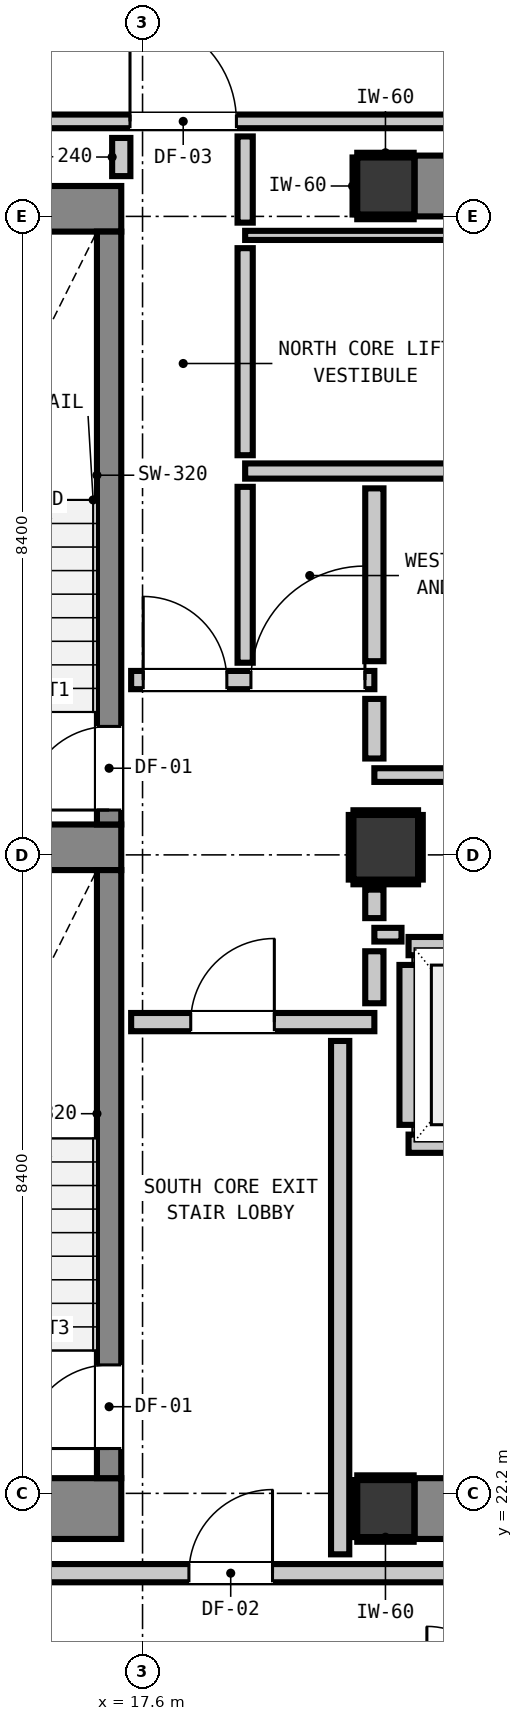
"""IFC4 building model, lengths in metres.
Left out: names, types, materials, properties, quantities, classifications, styles, units other than length and angle.
Written with IfcOpenShell. Run it as: python <this file> out.ifc"""

import sys

from ifc_helpers import new_model, si_unit, direction, frame, frame_2d, origin, origin_2d, place, context, subcontext, project, spatial, rectangle, extrude, element, fill, save


model = new_model("IFC4")
c1 = context("Model", 3, precision=1e-05, world=origin(), true_north=direction((0.0, 1.0)))
c2 = subcontext(c1, "Body", "Model", "MODEL_VIEW")
j1 = project(units=[si_unit("LENGTHUNIT", "METRE"), si_unit("PLANEANGLEUNIT", "RADIAN")], contexts=[c1])
p1 = place(None, origin())
s1 = spatial("IfcSite", under=j1, at=p1, CompositionType="ELEMENT")
p2 = place(p1, origin())
s2 = spatial("IfcBuilding", under=s1, at=p2, CompositionType="ELEMENT")
p3 = place(p2, frame((0.0, 0.0, 265.56)))
s3 = spatial("IfcBuildingStorey", under=s2, at=p3, CompositionType="ELEMENT", Elevation=265.56)
for number, where, z_axis, x_axis in (
    (1, (20.8, 22.0, 0.0), (0.0, 0.0, 1.0), (1.0, 0.0, 0.0)),
    (2, (20.8, 39.4, 0.0), (0.0, 0.0, 1.0), (1.0, 0.0, 0.0)),
):
    element("IfcColumn", number, at=place(p3, frame(where, z_axis=z_axis, x_axis=x_axis)), inside=s3, PredefinedType="COLUMN", context=c2, shape_type="SweptSolid", body=[
        extrude(rectangle(XDim=0.75, YDim=0.75, at=origin_2d()), origin(), (0.0, 0.0, 1.0), 3.32),
    ])
p4 = place(p3, frame((13.24, 22.0, 0.0), z_axis=(0.0, 0.0, 1.0), x_axis=(1.0, 0.0, 0.0)))
e3 = element("IfcWall", 3, at=p4, inside=s3, PredefinedType="SHEAR", context=c2, shape_type="SweptSolid", body=[
    extrude(rectangle(XDim=4.08, YDim=0.8, at=frame_2d((2.04, 0.0))), origin(), (0.0, 0.0, 1.0), 3.32),
])
p5 = place(p3, frame((13.24, 39.1, 0.0), z_axis=(0.0, 0.0, 1.0), x_axis=(1.0, 0.0, 0.0)))
e4 = element("IfcWall", 4, at=p5, inside=s3, PredefinedType="SHEAR", context=c2, shape_type="SweptSolid", body=[
    extrude(rectangle(XDim=4.08, YDim=0.6, at=frame_2d((2.04, 0.0))), origin(), (0.0, 0.0, 1.0), 3.32),
])
p6 = place(p3, frame((13.78, 30.7, 0.0), z_axis=(0.0, 0.0, 1.0), x_axis=(1.0, 0.0, 0.0)))
e5 = element("IfcWall", 5, at=p6, inside=s3, PredefinedType="SHEAR", context=c2, shape_type="SweptSolid", body=[
    extrude(rectangle(XDim=3.54, YDim=0.6, at=frame_2d((1.77, 0.0))), origin(), (0.0, 0.0, 1.0), 3.32),
])
for number, where, z_axis, x_axis in (
    (6, (21.18, 22.0, 0.0), (0.0, 0.0, 1.0), (1.0, 0.0, 0.0)),
    (7, (21.18, 39.4, 0.0), (0.0, 0.0, 1.0), (1.0, 0.0, 0.0)),
):
    element("IfcWall", number, at=place(p3, frame(where, z_axis=z_axis, x_axis=x_axis)), inside=s3, PredefinedType="SHEAR", context=c2, shape_type="SweptSolid", body=[
        extrude(rectangle(XDim=7.64, YDim=0.8, at=frame_2d((3.82, 0.0))), origin(), (0.0, 0.0, 1.0), 3.32),
    ])
p7 = place(p3, frame((17.16, 31.0, 0.0), z_axis=(0.0, 0.0, 1.0), x_axis=(0.0, 1.0, 0.0)))
e8 = element("IfcWall", 8, at=p7, inside=s3, PredefinedType="SHEAR", context=c2, shape_type="SweptSolid", body=[
    extrude(rectangle(XDim=7.8, YDim=0.32, at=frame_2d((3.9, 0.0))), origin(), (0.0, 0.0, 1.0), 3.32),
])
p8 = place(p7, frame((0.19, 0.0, 0.0)))
e9 = element("IfcOpeningElement", 9, at=p8, cuts=e8, PredefinedType="OPENING", context=c2, shape_type="SweptSolid", body=[
    extrude(rectangle(XDim=1.1, YDim=2.15, at=frame_2d((0.55, 1.075))), frame((0.0, 0.17, 0.0), z_axis=(0.0, -1.0, 0.0), x_axis=(1.0, 0.0, 0.0)), (0.0, 0.0, 1.0), 0.34),
])
p9 = place(p3, frame((17.16, 22.4, 0.0), z_axis=(0.0, 0.0, 1.0), x_axis=(0.0, 1.0, 0.0)))
e10 = element("IfcWall", 10, at=p9, inside=s3, PredefinedType="SHEAR", context=c2, shape_type="SweptSolid", body=[
    extrude(rectangle(XDim=8.0, YDim=0.32, at=frame_2d((4.0, 0.0))), origin(), (0.0, 0.0, 1.0), 3.32),
])
p10 = place(p9, frame((0.39, 0.0, 0.0)))
e11 = element("IfcOpeningElement", 11, at=p10, cuts=e10, PredefinedType="OPENING", context=c2, shape_type="SweptSolid", body=[
    extrude(rectangle(XDim=1.1, YDim=2.15, at=frame_2d((0.55, 1.075))), frame((0.0, 0.17, 0.0), z_axis=(0.0, -1.0, 0.0), x_axis=(1.0, 0.0, 0.0)), (0.0, 0.0, 1.0), 0.34),
])
p11 = place(p3, frame((20.8, 30.7, 0.0), z_axis=(0.0, 0.0, 1.0), x_axis=(1.0, 0.0, 0.0)))
e12 = element("IfcColumn", 12, at=p11, inside=s3, PredefinedType="COLUMN", context=c2, shape_type="SweptSolid", body=[
    extrude(rectangle(XDim=0.85, YDim=0.85, at=origin_2d()), origin(), (0.0, 0.0, 1.0), 3.32),
])
for number, where, z_axis, x_axis in (
    (13, (21.1, 26.8, 0.0), (0.0, 0.0, 1.0), (1.0, 0.0, 0.0)),
    (14, (21.1, 29.4, 0.0), (0.0, 0.0, 1.0), (1.0, 0.0, 0.0)),
):
    element("IfcWall", number, at=place(p3, frame(where, z_axis=z_axis, x_axis=x_axis)), inside=s3, PredefinedType="PARTITIONING", context=c2, shape_type="SweptSolid", body=[
        extrude(rectangle(XDim=2.2, YDim=0.24, at=frame_2d((1.1, 0.0))), origin(), (0.0, 0.0, 1.0), 3.1),
    ])
p12 = place(p3, frame((21.1, 27.048, 0.0), z_axis=(0.0, 0.0, 1.0), x_axis=(0.0, 1.0, 0.0)))
e15 = element("IfcWall", 15, at=p12, inside=s3, PredefinedType="PARTITIONING", context=c2, shape_type="SweptSolid", body=[
    extrude(rectangle(XDim=2.104, YDim=0.24, at=frame_2d((1.052, 0.0))), origin(), (0.0, 0.0, 1.0), 2.335),
])
p13 = place(p3, frame((13.012, 21.15, 0.0), z_axis=(0.0, 0.0, 1.0), x_axis=(1.0, 0.0, 0.0)))
e16 = element("IfcWall", 16, at=p13, inside=s3, PredefinedType="PARTITIONING", context=c2, shape_type="SweptSolid", body=[
    extrude(rectangle(XDim=28.201, YDim=0.24, at=frame_2d((14.101, 0.0))), origin(), (0.0, 0.0, 1.0), 3.1),
])
p14 = place(p13, frame((5.198, 0.0, 0.0)))
e17 = element("IfcOpeningElement", 17, at=p14, cuts=e16, PredefinedType="OPENING", context=c2, shape_type="SweptSolid", body=[
    extrude(rectangle(XDim=1.1, YDim=2.15, at=frame_2d((0.55, 1.075))), frame((0.0, 0.13, 0.0), z_axis=(0.0, -1.0, 0.0), x_axis=(1.0, 0.0, 0.0)), (0.0, 0.0, 1.0), 0.26),
])
p15 = place(p3, frame((17.45, 28.4, 0.0), z_axis=(0.0, 0.0, 1.0), x_axis=(1.0, 0.0, 0.0)))
e18 = element("IfcWall", 18, at=p15, inside=s3, PredefinedType="PARTITIONING", context=c2, shape_type="SweptSolid", body=[
    extrude(rectangle(XDim=3.2, YDim=0.24, at=frame_2d((1.6, 0.0))), origin(), (0.0, 0.0, 1.0), 3.1),
])
p16 = place(p15, frame((0.784, 0.0, 0.0)))
e19 = element("IfcOpeningElement", 19, at=p16, cuts=e18, PredefinedType="OPENING", context=c2, shape_type="SweptSolid", body=[
    extrude(rectangle(XDim=1.1, YDim=2.15, at=frame_2d((0.55, 1.075))), frame((0.0, 0.13, 0.0), z_axis=(0.0, -1.0, 0.0), x_axis=(1.0, 0.0, 0.0)), (0.0, 0.0, 1.0), 0.26),
])
p17 = place(p3, frame((17.45, 32.9, 0.0), z_axis=(0.0, 0.0, 1.0), x_axis=(1.0, 0.0, 0.0)))
e20 = element("IfcWall", 20, at=p17, inside=s3, PredefinedType="PARTITIONING", context=c2, shape_type="SweptSolid", body=[
    extrude(rectangle(XDim=3.2, YDim=0.24, at=frame_2d((1.6, 0.0))), origin(), (0.0, 0.0, 1.0), 3.1),
])
p18 = place(p17, frame((0.159, 0.0, 0.0)))
e21 = element("IfcOpeningElement", 21, at=p18, cuts=e20, PredefinedType="OPENING", context=c2, shape_type="SweptSolid", body=[
    extrude(rectangle(XDim=1.1, YDim=2.15, at=frame_2d((0.55, 1.075))), frame((0.0, 0.13, 0.0), z_axis=(0.0, -1.0, 0.0), x_axis=(1.0, 0.0, 0.0)), (0.0, 0.0, 1.0), 0.26),
])
p19 = place(p17, frame((1.576, 0.0, 0.0)))
e22 = element("IfcOpeningElement", 22, at=p19, cuts=e20, PredefinedType="OPENING", context=c2, shape_type="SweptSolid", body=[
    extrude(rectangle(XDim=1.5, YDim=2.15, at=frame_2d((0.75, 1.075))), frame((0.0, 0.13, 0.0), z_axis=(0.0, -1.0, 0.0), x_axis=(1.0, 0.0, 0.0)), (0.0, 0.0, 1.0), 0.26),
])
p20 = place(p3, frame((18.95, 35.65, 0.0), z_axis=(0.0, 0.0, 1.0), x_axis=(1.0, 0.0, 0.0)))
e23 = element("IfcWall", 23, at=p20, inside=s3, PredefinedType="PARTITIONING", context=c2, shape_type="SweptSolid", body=[
    extrude(rectangle(XDim=11.025, YDim=0.2, at=frame_2d((5.513, 0.0))), origin(), (0.0, 0.0, 1.0), 3.1),
])
p21 = place(p20, frame((9.749, 0.0, 0.0)))
e24 = element("IfcOpeningElement", 24, at=p21, cuts=e23, PredefinedType="OPENING", context=c2, shape_type="SweptSolid", body=[
    extrude(rectangle(XDim=0.9, YDim=2.1, at=frame_2d((0.45, 1.05))), frame((0.0, 0.11, 0.0), z_axis=(0.0, -1.0, 0.0), x_axis=(1.0, 0.0, 0.0)), (0.0, 0.0, 1.0), 0.22),
])
p22 = place(p3, frame((20.65, 29.55, 0.0), z_axis=(0.0, 0.0, 1.0), x_axis=(1.0, 0.0, 0.0)))
e25 = element("IfcWall", 25, at=p22, inside=s3, PredefinedType="PARTITIONING", context=c2, shape_type="SweptSolid", body=[
    extrude(rectangle(XDim=0.357, YDim=0.18, at=frame_2d((0.179, 0.0))), origin(), (0.0, 0.0, 1.0), 3.1),
])
p23 = place(p3, frame((20.65, 31.65, 0.0), z_axis=(0.0, 0.0, 1.0), x_axis=(1.0, 0.0, 0.0)))
e26 = element("IfcWall", 26, at=p23, inside=s3, PredefinedType="PARTITIONING", context=c2, shape_type="SweptSolid", body=[
    extrude(rectangle(XDim=7.7, YDim=0.18, at=frame_2d((3.85, 0.0))), origin(), (0.0, 0.0, 1.0), 3.1),
])
p24 = place(p23, frame((4.673, 0.0, 0.0)))
e27 = element("IfcOpeningElement", 27, at=p24, cuts=e26, PredefinedType="OPENING", context=c2, shape_type="SweptSolid", body=[
    extrude(rectangle(XDim=0.9, YDim=2.1, at=frame_2d((0.45, 1.05))), frame((0.0, 0.1, 0.0), z_axis=(0.0, -1.0, 0.0), x_axis=(1.0, 0.0, 0.0)), (0.0, 0.0, 1.0), 0.2),
])
p25 = place(p3, frame((4.587, 40.25, 0.0), z_axis=(0.0, 0.0, 1.0), x_axis=(1.0, 0.0, 0.0)))
e28 = element("IfcWall", 28, at=p25, inside=s3, PredefinedType="PARTITIONING", context=c2, shape_type="SweptSolid", body=[
    extrude(rectangle(XDim=36.626, YDim=0.18, at=frame_2d((18.313, 0.0))), origin(), (0.0, 0.0, 1.0), 3.1),
])
p26 = place(p25, frame((12.848, 0.0, 0.0)))
e29 = element("IfcOpeningElement", 29, at=p26, cuts=e28, PredefinedType="OPENING", context=c2, shape_type="SweptSolid", body=[
    extrude(rectangle(XDim=1.4, YDim=2.15, at=frame_2d((0.7, 1.075))), frame((0.0, 0.1, 0.0), z_axis=(0.0, -1.0, 0.0), x_axis=(1.0, 0.0, 0.0)), (0.0, 0.0, 1.0), 0.2),
])
p27 = place(p25, frame((3.362, 0.0, 0.0)))
e30 = element("IfcOpeningElement", 30, at=p27, cuts=e28, PredefinedType="OPENING", context=c2, shape_type="SweptSolid", body=[
    extrude(rectangle(XDim=0.9, YDim=2.1, at=frame_2d((0.45, 1.05))), frame((0.0, 0.1, 0.0), z_axis=(0.0, -1.0, 0.0), x_axis=(1.0, 0.0, 0.0)), (0.0, 0.0, 1.0), 0.2),
])
p28 = place(p3, frame((18.95, 38.75, 0.0), z_axis=(0.0, 0.0, 1.0), x_axis=(1.0, 0.0, 0.0)))
e31 = element("IfcWall", 31, at=p28, inside=s3, PredefinedType="PARTITIONING", context=c2, shape_type="SweptSolid", body=[
    extrude(rectangle(XDim=13.56, YDim=0.12, at=frame_2d((6.78, 0.0))), origin(), (0.0, 0.0, 1.0), 3.1),
])
p29 = place(p3, frame((17.32, 39.53, 0.0), z_axis=(0.0, 0.0, 1.0), x_axis=(0.0, 1.0, 0.0)))
e32 = element("IfcWall", 32, at=p29, inside=s3, PredefinedType="PARTITIONING", context=c2, shape_type="SweptSolid", body=[
    extrude(rectangle(XDim=0.502, YDim=0.24, at=frame_2d((0.251, 0.0))), origin(), (0.0, 0.0, 1.0), 3.1),
])
p30 = place(p3, frame((20.2, 21.398, 0.0), z_axis=(0.0, 0.0, 1.0), x_axis=(0.0, 1.0, 0.0)))
e33 = element("IfcWall", 33, at=p30, inside=s3, PredefinedType="PARTITIONING", context=c2, shape_type="SweptSolid", body=[
    extrude(rectangle(XDim=6.754, YDim=0.24, at=frame_2d((3.377, 0.0))), origin(), (0.0, 0.0, 1.0), 3.1),
])
p31 = place(p3, frame((20.65, 28.648, 0.0), z_axis=(0.0, 0.0, 1.0), x_axis=(0.0, 1.0, 0.0)))
e34 = element("IfcWall", 34, at=p31, inside=s3, PredefinedType="PARTITIONING", context=c2, shape_type="SweptSolid", body=[
    extrude(rectangle(XDim=0.684, YDim=0.24, at=frame_2d((0.342, 0.0))), origin(), (0.0, 0.0, 1.0), 2.335),
])
p32 = place(p3, frame((20.65, 29.768, 0.0), z_axis=(0.0, 0.0, 1.0), x_axis=(0.0, 1.0, 0.0)))
e35 = element("IfcWall", 35, at=p32, inside=s3, PredefinedType="PARTITIONING", context=c2, shape_type="SweptSolid", body=[
    extrude(rectangle(XDim=0.375, YDim=0.24, at=frame_2d((0.188, 0.0))), origin(), (0.0, 0.0, 1.0), 2.335),
])
p33 = place(p3, frame((20.65, 31.868, 0.0), z_axis=(0.0, 0.0, 1.0), x_axis=(0.0, 1.0, 0.0)))
e36 = element("IfcWall", 36, at=p33, inside=s3, PredefinedType="PARTITIONING", context=c2, shape_type="SweptSolid", body=[
    extrude(rectangle(XDim=0.784, YDim=0.24, at=frame_2d((0.392, 0.0))), origin(), (0.0, 0.0, 1.0), 2.335),
])
p34 = place(p3, frame((20.65, 33.148, 0.0), z_axis=(0.0, 0.0, 1.0), x_axis=(0.0, 1.0, 0.0)))
e37 = element("IfcWall", 37, at=p34, inside=s3, PredefinedType="PARTITIONING", context=c2, shape_type="SweptSolid", body=[
    extrude(rectangle(XDim=2.274, YDim=0.24, at=frame_2d((1.137, 0.0))), origin(), (0.0, 0.0, 1.0), 2.335),
])
p35 = place(p3, frame((18.95, 33.128, 0.0), z_axis=(0.0, 0.0, 1.0), x_axis=(0.0, 1.0, 0.0)))
e38 = element("IfcWall", 38, at=p35, inside=s3, PredefinedType="PARTITIONING", context=c2, shape_type="SweptSolid", body=[
    extrude(rectangle(XDim=2.314, YDim=0.2, at=frame_2d((1.157, 0.0))), origin(), (0.0, 0.0, 1.0), 3.1),
])
p36 = place(p3, frame((18.95, 35.858, 0.0), z_axis=(0.0, 0.0, 1.0), x_axis=(0.0, 1.0, 0.0)))
e39 = element("IfcWall", 39, at=p36, inside=s3, PredefinedType="PARTITIONING", context=c2, shape_type="SweptSolid", body=[
    extrude(rectangle(XDim=2.724, YDim=0.2, at=frame_2d((1.362, 0.0))), origin(), (0.0, 0.0, 1.0), 3.1),
])
p37 = place(p3, frame((18.95, 38.918, 0.0), z_axis=(0.0, 0.0, 1.0), x_axis=(0.0, 1.0, 0.0)))
e40 = element("IfcWall", 40, at=p37, inside=s3, PredefinedType="PARTITIONING", context=c2, shape_type="SweptSolid", body=[
    extrude(rectangle(XDim=1.134, YDim=0.2, at=frame_2d((0.567, 0.0))), origin(), (0.0, 0.0, 1.0), 3.1),
])
for number, where, z_axis, x_axis in (
    (41, (20.425, 21.593, 0.0), (0.0, 0.0, 1.0), (1.0, 0.0, 0.0)),
    (42, (20.425, 22.407, 0.0), (0.0, 0.0, 1.0), (1.0, 0.0, 0.0)),
):
    element("IfcWall", number, at=place(p3, frame(where, z_axis=z_axis, x_axis=x_axis)), inside=s3, PredefinedType="PARTITIONING", context=c2, shape_type="SweptSolid", body=[
        extrude(rectangle(XDim=0.742, YDim=0.06, at=frame_2d((0.371, 0.0))), origin(), (0.0, 0.0, 1.0), 1.45),
    ])
p38 = place(p3, frame((20.393, 21.625, 0.0), z_axis=(0.0, 0.0, 1.0), x_axis=(0.0, 1.0, 0.0)))
e43 = element("IfcWall", 43, at=p38, inside=s3, PredefinedType="PARTITIONING", context=c2, shape_type="SweptSolid", body=[
    extrude(rectangle(XDim=0.75, YDim=0.06, at=frame_2d((0.375, 0.0))), origin(), (0.0, 0.0, 1.0), 1.45),
])
for number, where, z_axis, x_axis in (
    (44, (20.425, 38.993, 0.0), (0.0, 0.0, 1.0), (1.0, 0.0, 0.0)),
    (45, (20.425, 39.807, 0.0), (0.0, 0.0, 1.0), (1.0, 0.0, 0.0)),
):
    element("IfcWall", number, at=place(p3, frame(where, z_axis=z_axis, x_axis=x_axis)), inside=s3, PredefinedType="PARTITIONING", context=c2, shape_type="SweptSolid", body=[
        extrude(rectangle(XDim=0.742, YDim=0.06, at=frame_2d((0.371, 0.0))), origin(), (0.0, 0.0, 1.0), 1.45),
    ])
p39 = place(p3, frame((20.393, 39.025, 0.0), z_axis=(0.0, 0.0, 1.0), x_axis=(0.0, 1.0, 0.0)))
e46 = element("IfcWall", 46, at=p39, inside=s3, PredefinedType="PARTITIONING", context=c2, shape_type="SweptSolid", body=[
    extrude(rectangle(XDim=0.75, YDim=0.06, at=frame_2d((0.375, 0.0))), origin(), (0.0, 0.0, 1.0), 1.45),
])
for number, where, z_axis, x_axis in (
    (47, (20.375, 30.243, 0.0), (0.0, 0.0, 1.0), (1.0, 0.0, 0.0)),
    (48, (20.375, 31.157, 0.0), (0.0, 0.0, 1.0), (1.0, 0.0, 0.0)),
    (49, (20.343, 30.275, 0.0), (0.0, 0.0, 1.0), (0.0, 1.0, 0.0)),
    (50, (21.257, 30.275, 0.0), (0.0, 0.0, 1.0), (0.0, 1.0, 0.0)),
):
    element("IfcWall", number, at=place(p3, frame(where, z_axis=z_axis, x_axis=x_axis)), inside=s3, PredefinedType="PARTITIONING", context=c2, shape_type="SweptSolid", body=[
        extrude(rectangle(XDim=0.85, YDim=0.06, at=frame_2d((0.425, 0.0))), origin(), (0.0, 0.0, 1.0), 1.45),
    ])
p40 = place(p8, origin())
e51 = element("IfcDoor", 51, at=p40, inside=s3, OperationType="SINGLE_SWING_LEFT", PredefinedType="DOOR", context=c2, shape_type="SweptSolid", body=[
    extrude(rectangle(XDim=1.1, YDim=2.15, at=frame_2d((0.55, 1.075))), frame((0.0, 0.025, 0.0), z_axis=(0.0, -1.0, 0.0), x_axis=(1.0, 0.0, 0.0)), (0.0, 0.0, 1.0), 0.05),
])
fill(e9, e51)
p41 = place(p10, origin())
e52 = element("IfcDoor", 52, at=p41, inside=s3, OperationType="SINGLE_SWING_LEFT", PredefinedType="DOOR", context=c2, shape_type="SweptSolid", body=[
    extrude(rectangle(XDim=1.1, YDim=2.15, at=frame_2d((0.55, 1.075))), frame((0.0, 0.025, 0.0), z_axis=(0.0, -1.0, 0.0), x_axis=(1.0, 0.0, 0.0)), (0.0, 0.0, 1.0), 0.05),
])
fill(e11, e52)
p42 = place(p16, origin())
e53 = element("IfcDoor", 53, at=p42, inside=s3, OperationType="SINGLE_SWING_RIGHT", PredefinedType="DOOR", context=c2, shape_type="SweptSolid", body=[
    extrude(rectangle(XDim=1.1, YDim=2.15, at=frame_2d((0.55, 1.075))), frame((0.0, 0.025, 0.0), z_axis=(0.0, -1.0, 0.0), x_axis=(1.0, 0.0, 0.0)), (0.0, 0.0, 1.0), 0.05),
])
fill(e19, e53)
p43 = place(p18, origin())
e54 = element("IfcDoor", 54, at=p43, inside=s3, OperationType="SINGLE_SWING_LEFT", PredefinedType="DOOR", context=c2, shape_type="SweptSolid", body=[
    extrude(rectangle(XDim=1.1, YDim=2.15, at=frame_2d((0.55, 1.075))), frame((0.0, 0.025, 0.0), z_axis=(0.0, -1.0, 0.0), x_axis=(1.0, 0.0, 0.0)), (0.0, 0.0, 1.0), 0.05),
])
fill(e21, e54)
p44 = place(p14, origin())
e55 = element("IfcDoor", 55, at=p44, inside=s3, OperationType="SINGLE_SWING_RIGHT", PredefinedType="DOOR", context=c2, shape_type="SweptSolid", body=[
    extrude(rectangle(XDim=1.1, YDim=2.15, at=frame_2d((0.55, 1.075))), frame((0.0, 0.025, 0.0), z_axis=(0.0, -1.0, 0.0), x_axis=(1.0, 0.0, 0.0)), (0.0, 0.0, 1.0), 0.05),
])
fill(e17, e55)
p45 = place(p26, origin())
e56 = element("IfcDoor", 56, at=p45, inside=s3, OperationType="SINGLE_SWING_LEFT", PredefinedType="DOOR", context=c2, shape_type="SweptSolid", body=[
    extrude(rectangle(XDim=1.4, YDim=2.15, at=frame_2d((0.7, 1.075))), frame((0.0, 0.025, 0.0), z_axis=(0.0, -1.0, 0.0), x_axis=(1.0, 0.0, 0.0)), (0.0, 0.0, 1.0), 0.05),
])
fill(e29, e56)
p46 = place(p19, origin())
e57 = element("IfcDoor", 57, at=p46, inside=s3, OperationType="SINGLE_SWING_RIGHT", PredefinedType="DOOR", context=c2, shape_type="SweptSolid", body=[
    extrude(rectangle(XDim=1.5, YDim=2.15, at=frame_2d((0.75, 1.075))), frame((0.0, 0.025, 0.0), z_axis=(0.0, -1.0, 0.0), x_axis=(1.0, 0.0, 0.0)), (0.0, 0.0, 1.0), 0.05),
])
fill(e22, e57)
save(model, sys.argv[1])
